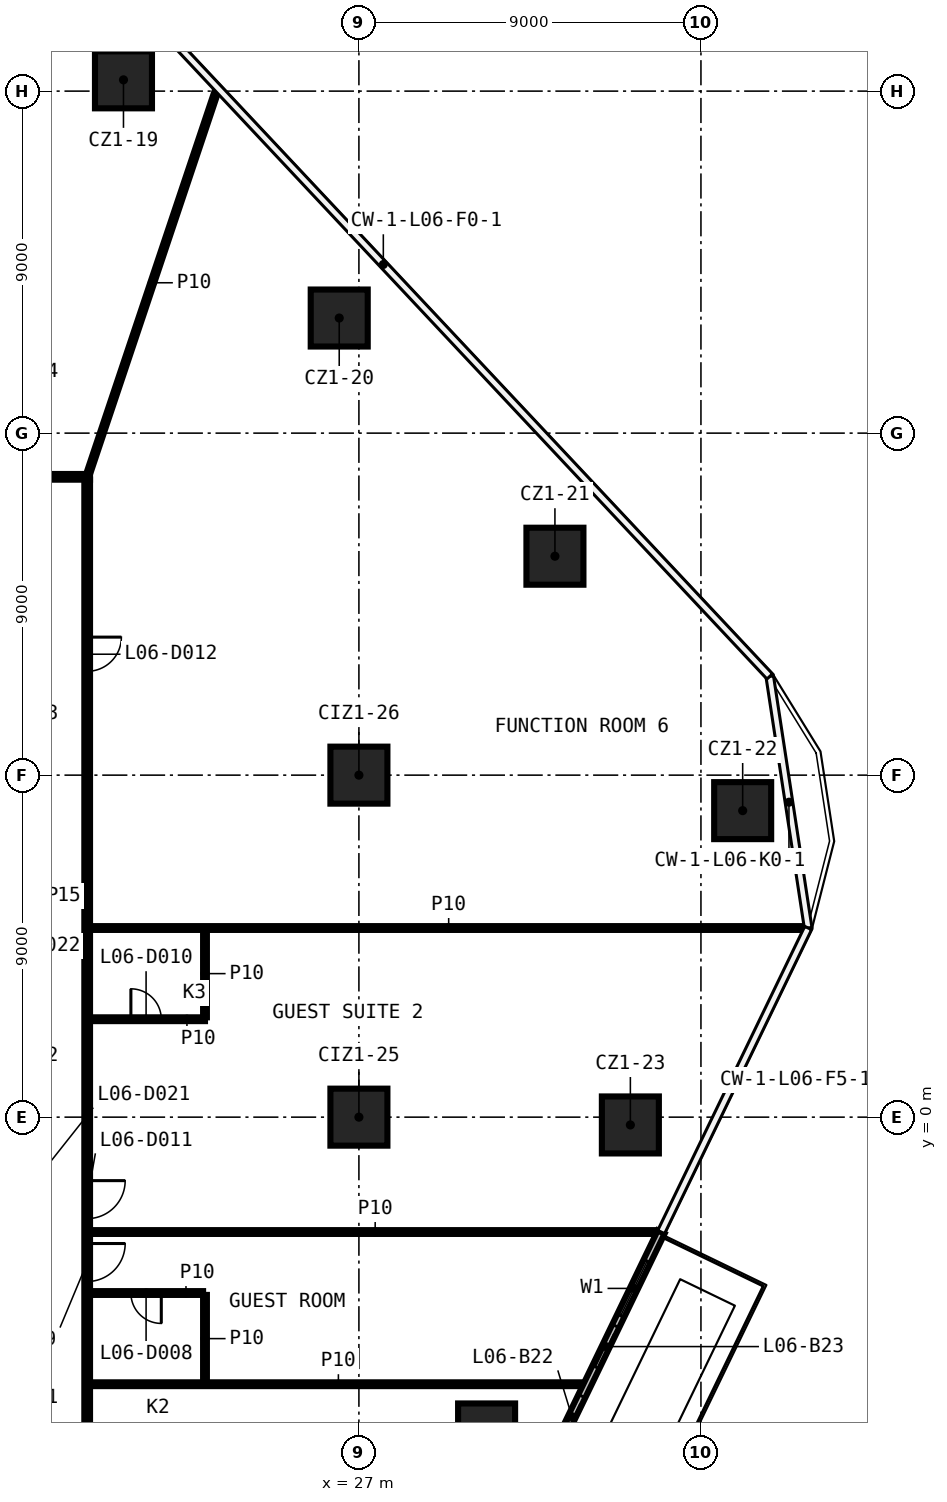
"""IFC4 building model, lengths in metres.
Left out: names, types, materials, properties, quantities, classifications, styles, units other than length and angle.
Written with IfcOpenShell. Run it as: python <this file> out.ifc"""

import sys

from ifc_helpers import new_model, si_unit, direction, frame, frame_2d, origin, origin_2d, place, context, subcontext, project, spatial, rectangle, extrude, element, fill, save


model = new_model("IFC4")
c1 = context("Model", 3, precision=1e-05, world=origin(), true_north=direction((0.0, 1.0)))
c2 = subcontext(c1, "Body", "Model", "MODEL_VIEW")
j1 = project(units=[si_unit("LENGTHUNIT", "METRE"), si_unit("PLANEANGLEUNIT", "RADIAN")], contexts=[c1])
p1 = place(None, origin())
s1 = spatial("IfcSite", under=j1, at=p1, CompositionType="ELEMENT")
p2 = place(p1, origin())
s2 = spatial("IfcBuilding", under=s1, at=p2, CompositionType="ELEMENT")
p3 = place(p2, frame((0.0, 0.0, 44.0)))
s3 = spatial("IfcBuildingStorey", under=s2, at=p3, CompositionType="ELEMENT", Elevation=44.0)
for number, where, z_axis, x_axis in (
    (1, (20.805, 27.297, 0.0), (0.0, 0.0, 1.0), (1.0, 0.0, 0.0)),
    (2, (26.482, 21.029, 0.0), (0.0, 0.0, 1.0), (1.0, 0.0, 0.0)),
    (3, (32.158, 14.761, 0.0), (0.0, 0.0, 1.0), (1.0, 0.0, 0.0)),
    (4, (37.098, 8.066, 0.0), (0.0, 0.0, 1.0), (1.0, 0.0, 0.0)),
    (5, (34.143, -0.205, 0.0), (0.0, 0.0, 1.0), (1.0, 0.0, 0.0)),
    (6, (30.36, -8.284, 0.0), (0.0, 0.0, 1.0), (1.0, 0.0, 0.0)),
    (7, (27.0, 0.0, 0.0), (0.0, 0.0, 1.0), (1.0, 0.0, 0.0)),
    (8, (27.0, 9.0, 0.0), (0.0, 0.0, 1.0), (1.0, 0.0, 0.0)),
):
    element("IfcColumn", number, at=place(p3, frame(where, z_axis=z_axis, x_axis=x_axis)), inside=s3, PredefinedType="COLUMN", context=c2, shape_type="SweptSolid", body=[
        extrude(rectangle(XDim=1.5, YDim=1.5, at=origin_2d()), origin(), (0.0, 0.0, 1.0), 3.3),
    ])
p4 = place(p3, frame((19.925, -7.028, 0.0), z_axis=(0.0, 0.0, 1.0), x_axis=(1.0, 0.0, 0.0)))
e9 = element("IfcWall", 9, at=p4, inside=s3, PredefinedType="PARTITIONING", context=c2, shape_type="SweptSolid", body=[
    extrude(rectangle(XDim=13.071, YDim=0.1, at=frame_2d((6.535, 0.0))), origin(), (0.0, 0.0, 1.0), 3.3),
])
p5 = place(p3, frame((22.9, -4.628, 0.0), z_axis=(0.0, 0.0, 1.0), x_axis=(-1.0, 0.0, 0.0)))
e10 = element("IfcWall", 10, at=p5, inside=s3, PredefinedType="PARTITIONING", context=c2, shape_type="SweptSolid", body=[
    extrude(rectangle(XDim=2.975, YDim=0.1, at=frame_2d((1.487, 0.0))), origin(), (0.0, 0.0, 1.0), 3.3),
])
p6 = place(p5, frame((1.1, 0.0, 0.0)))
e11 = element("IfcOpeningElement", 11, at=p6, cuts=e10, PredefinedType="OPENING", context=c2, shape_type="SweptSolid", body=[
    extrude(rectangle(XDim=0.8, YDim=2.1, at=frame_2d((0.4, 1.05))), frame((0.0, 0.06, 0.0), z_axis=(0.0, -1.0, 0.0), x_axis=(1.0, 0.0, 0.0)), (0.0, 0.0, 1.0), 0.12),
])
p7 = place(p3, frame((19.925, -3.023, 0.0), z_axis=(0.0, 0.0, 1.0), x_axis=(1.0, 0.0, 0.0)))
e12 = element("IfcWall", 12, at=p7, inside=s3, PredefinedType="PARTITIONING", context=c2, shape_type="SweptSolid", body=[
    extrude(rectangle(XDim=15.006, YDim=0.1, at=frame_2d((7.503, 0.0))), origin(), (0.0, 0.0, 1.0), 3.3),
])
p8 = place(p3, frame((19.925, 2.577, 0.0), z_axis=(0.0, 0.0, 1.0), x_axis=(1.0, 0.0, 0.0)))
e13 = element("IfcWall", 13, at=p8, inside=s3, PredefinedType="PARTITIONING", context=c2, shape_type="SweptSolid", body=[
    extrude(rectangle(XDim=3.025, YDim=0.1, at=frame_2d((1.512, 0.0))), origin(), (0.0, 0.0, 1.0), 3.3),
])
p9 = place(p8, frame((1.075, 0.0, 0.0)))
e14 = element("IfcOpeningElement", 14, at=p9, cuts=e13, PredefinedType="OPENING", context=c2, shape_type="SweptSolid", body=[
    extrude(rectangle(XDim=0.8, YDim=2.1, at=frame_2d((0.4, 1.05))), frame((0.0, 0.06, 0.0), z_axis=(0.0, -1.0, 0.0), x_axis=(1.0, 0.0, 0.0)), (0.0, 0.0, 1.0), 0.12),
])
p10 = place(p3, frame((19.925, 4.977, 0.0), z_axis=(0.0, 0.0, 1.0), x_axis=(1.0, 0.0, 0.0)))
e15 = element("IfcWall", 15, at=p10, inside=s3, PredefinedType="PARTITIONING", context=c2, shape_type="SweptSolid", body=[
    extrude(rectangle(XDim=18.874, YDim=0.1, at=frame_2d((9.437, 0.0))), origin(), (0.0, 0.0, 1.0), 3.3),
])
p11 = place(p3, frame((-19.925, 16.85, 0.0), z_axis=(0.0, 0.0, 1.0), x_axis=(1.0, 0.0, 0.0)))
e16 = element("IfcWall", 16, at=p11, inside=s3, PredefinedType="PARTITIONING", context=c2, shape_type="SweptSolid", body=[
    extrude(rectangle(XDim=39.85, YDim=0.15, at=frame_2d((19.925, 0.0))), origin(), (0.0, 0.0, 1.0), 3.3),
])
p12 = place(p11, frame((31.643, 0.0, 0.0)))
e17 = element("IfcOpeningElement", 17, at=p12, cuts=e16, PredefinedType="OPENING", context=c2, shape_type="SweptSolid", body=[
    extrude(rectangle(XDim=0.9, YDim=2.1, at=frame_2d((0.45, 1.05))), frame((0.0, 0.085, 0.0), z_axis=(0.0, -1.0, 0.0), x_axis=(1.0, 0.0, 0.0)), (0.0, 0.0, 1.0), 0.17),
])
p13 = place(p11, frame((22.056, 0.0, 0.0)))
e18 = element("IfcOpeningElement", 18, at=p13, cuts=e16, PredefinedType="OPENING", context=c2, shape_type="SweptSolid", body=[
    extrude(rectangle(XDim=0.9, YDim=2.1, at=frame_2d((0.45, 1.05))), frame((0.0, 0.085, 0.0), z_axis=(0.0, -1.0, 0.0), x_axis=(1.0, 0.0, 0.0)), (0.0, 0.0, 1.0), 0.17),
])
p14 = place(p11, frame((14.831, 0.0, 0.0)))
e19 = element("IfcOpeningElement", 19, at=p14, cuts=e16, PredefinedType="OPENING", context=c2, shape_type="SweptSolid", body=[
    extrude(rectangle(XDim=1.0, YDim=2.1, at=frame_2d((0.5, 1.05))), frame((0.0, 0.085, 0.0), z_axis=(0.0, -1.0, 0.0), x_axis=(1.0, 0.0, 0.0)), (0.0, 0.0, 1.0), 0.17),
])
p15 = place(p3, frame((19.85, 16.85, 0.0), z_axis=(0.0, 0.0, 1.0), x_axis=(0.317967659794, 0.948101559605, 0.0)))
e20 = element("IfcWall", 20, at=p15, inside=s3, PredefinedType="PARTITIONING", context=c2, shape_type="SweptSolid", body=[
    extrude(rectangle(XDim=10.773, YDim=0.1, at=frame_2d((5.387, 0.0))), origin(), (0.0, 0.0, 1.0), 3.3),
])
p16 = place(p3, frame((22.95, -6.978, 0.0), z_axis=(0.0, 0.0, 1.0), x_axis=(0.0, 1.0, 0.0)))
e21 = element("IfcWall", 21, at=p16, inside=s3, PredefinedType="PARTITIONING", context=c2, shape_type="SweptSolid", body=[
    extrude(rectangle(XDim=2.3, YDim=0.1, at=frame_2d((1.15, 0.0))), origin(), (0.0, 0.0, 1.0), 3.3),
])
p17 = place(p3, frame((22.95, 2.627, 0.0), z_axis=(0.0, 0.0, 1.0), x_axis=(0.0, 1.0, 0.0)))
e22 = element("IfcWall", 22, at=p17, inside=s3, PredefinedType="PARTITIONING", context=c2, shape_type="SweptSolid", body=[
    extrude(rectangle(XDim=2.3, YDim=0.1, at=frame_2d((1.15, 0.0))), origin(), (0.0, 0.0, 1.0), 3.3),
])
p18 = place(p3, frame((19.85, 16.775, 0.0), z_axis=(0.0, 0.0, 1.0), x_axis=(0.0, -1.0, 0.0)))
e23 = element("IfcWall", 23, at=p18, inside=s3, PredefinedType="PARTITIONING", context=c2, shape_type="SweptSolid", body=[
    extrude(rectangle(XDim=33.55, YDim=0.15, at=frame_2d((16.775, 0.0))), origin(), (0.0, 0.0, 1.0), 3.3),
])
p19 = place(p18, frame((29.016, 0.0, 0.0)))
e24 = element("IfcOpeningElement", 24, at=p19, cuts=e23, PredefinedType="OPENING", context=c2, shape_type="SweptSolid", body=[
    extrude(rectangle(XDim=1.0, YDim=2.1, at=frame_2d((0.5, 1.05))), frame((0.0, 0.085, 0.0), z_axis=(0.0, -1.0, 0.0), x_axis=(1.0, 0.0, 0.0)), (0.0, 0.0, 1.0), 0.17),
])
p20 = place(p18, frame((20.1, 0.0, 0.0)))
e25 = element("IfcOpeningElement", 25, at=p20, cuts=e23, PredefinedType="OPENING", context=c2, shape_type="SweptSolid", body=[
    extrude(rectangle(XDim=1.0, YDim=2.1, at=frame_2d((0.5, 1.05))), frame((0.0, 0.085, 0.0), z_axis=(0.0, -1.0, 0.0), x_axis=(1.0, 0.0, 0.0)), (0.0, 0.0, 1.0), 0.17),
])
p21 = place(p18, frame((18.446, 0.0, 0.0)))
e26 = element("IfcOpeningElement", 26, at=p21, cuts=e23, PredefinedType="OPENING", context=c2, shape_type="SweptSolid", body=[
    extrude(rectangle(XDim=1.0, YDim=2.1, at=frame_2d((0.5, 1.05))), frame((0.0, 0.085, 0.0), z_axis=(0.0, -1.0, 0.0), x_axis=(1.0, 0.0, 0.0)), (0.0, 0.0, 1.0), 0.17),
])
p22 = place(p18, frame((4.143, 0.0, 0.0)))
e27 = element("IfcOpeningElement", 27, at=p22, cuts=e23, PredefinedType="OPENING", context=c2, shape_type="SweptSolid", body=[
    extrude(rectangle(XDim=0.9, YDim=2.1, at=frame_2d((0.45, 1.05))), frame((0.0, 0.085, 0.0), z_axis=(0.0, -1.0, 0.0), x_axis=(1.0, 0.0, 0.0)), (0.0, 0.0, 1.0), 0.17),
])
p23 = place(p3, frame((23.338, -27.051, 0.0), z_axis=(0.0, 0.0, 1.0), x_axis=(0.43524886879, 0.900310181114, 0.0)))
e28 = element("IfcWall", 28, at=p23, inside=s3, PredefinedType="SOLIDWALL", context=c2, shape_type="SweptSolid", body=[
    extrude(rectangle(XDim=26.689, YDim=0.2, at=frame_2d((13.344, 0.0))), origin(), (0.0, 0.0, 1.0), 3.3),
])
p24 = place(p23, frame((0.5, 0.0, 0.6)))
e29 = element("IfcOpeningElement", 29, at=p24, cuts=e28, PredefinedType="OPENING", context=c2, shape_type="SweptSolid", body=[
    extrude(rectangle(XDim=1.6, YDim=2.4, at=frame_2d((0.8, 1.2))), frame((0.0, 0.11, 0.0), z_axis=(0.0, -1.0, 0.0), x_axis=(1.0, 0.0, 0.0)), (0.0, 0.0, 1.0), 0.22),
])
p25 = place(p23, frame((3.0, 0.0, 0.0)))
e30 = element("IfcOpeningElement", 30, at=p25, cuts=e28, PredefinedType="OPENING", context=c2, shape_type="SweptSolid", body=[
    extrude(rectangle(XDim=1.2, YDim=2.4, at=frame_2d((0.6, 1.2))), frame((0.0, 0.11, 0.0), z_axis=(0.0, -1.0, 0.0), x_axis=(1.0, 0.0, 0.0)), (0.0, 0.0, 1.0), 0.22),
])
p26 = place(p23, frame((6.448, 0.0, 0.6)))
e31 = element("IfcOpeningElement", 31, at=p26, cuts=e28, PredefinedType="OPENING", context=c2, shape_type="SweptSolid", body=[
    extrude(rectangle(XDim=1.6, YDim=2.4, at=frame_2d((0.8, 1.2))), frame((0.0, 0.11, 0.0), z_axis=(0.0, -1.0, 0.0), x_axis=(1.0, 0.0, 0.0)), (0.0, 0.0, 1.0), 0.22),
])
p27 = place(p23, frame((4.948, 0.0, 0.0)))
e32 = element("IfcOpeningElement", 32, at=p27, cuts=e28, PredefinedType="OPENING", context=c2, shape_type="SweptSolid", body=[
    extrude(rectangle(XDim=1.2, YDim=2.4, at=frame_2d((0.6, 1.2))), frame((0.0, 0.11, 0.0), z_axis=(0.0, -1.0, 0.0), x_axis=(1.0, 0.0, 0.0)), (0.0, 0.0, 1.0), 0.22),
])
p28 = place(p23, frame((9.396, 0.0, 0.6)))
e33 = element("IfcOpeningElement", 33, at=p28, cuts=e28, PredefinedType="OPENING", context=c2, shape_type="SweptSolid", body=[
    extrude(rectangle(XDim=1.6, YDim=2.4, at=frame_2d((0.8, 1.2))), frame((0.0, 0.11, 0.0), z_axis=(0.0, -1.0, 0.0), x_axis=(1.0, 0.0, 0.0)), (0.0, 0.0, 1.0), 0.22),
])
p29 = place(p23, frame((11.896, 0.0, 0.0)))
e34 = element("IfcOpeningElement", 34, at=p29, cuts=e28, PredefinedType="OPENING", context=c2, shape_type="SweptSolid", body=[
    extrude(rectangle(XDim=1.2, YDim=2.4, at=frame_2d((0.6, 1.2))), frame((0.0, 0.11, 0.0), z_axis=(0.0, -1.0, 0.0), x_axis=(1.0, 0.0, 0.0)), (0.0, 0.0, 1.0), 0.22),
])
p30 = place(p23, frame((15.344, 0.0, 0.6)))
e35 = element("IfcOpeningElement", 35, at=p30, cuts=e28, PredefinedType="OPENING", context=c2, shape_type="SweptSolid", body=[
    extrude(rectangle(XDim=1.6, YDim=2.4, at=frame_2d((0.8, 1.2))), frame((0.0, 0.11, 0.0), z_axis=(0.0, -1.0, 0.0), x_axis=(1.0, 0.0, 0.0)), (0.0, 0.0, 1.0), 0.22),
])
p31 = place(p23, frame((13.844, 0.0, 0.0)))
e36 = element("IfcOpeningElement", 36, at=p31, cuts=e28, PredefinedType="OPENING", context=c2, shape_type="SweptSolid", body=[
    extrude(rectangle(XDim=1.2, YDim=2.4, at=frame_2d((0.6, 1.2))), frame((0.0, 0.11, 0.0), z_axis=(0.0, -1.0, 0.0), x_axis=(1.0, 0.0, 0.0)), (0.0, 0.0, 1.0), 0.22),
])
p32 = place(p23, frame((18.292, 0.0, 0.6)))
e37 = element("IfcOpeningElement", 37, at=p32, cuts=e28, PredefinedType="OPENING", context=c2, shape_type="SweptSolid", body=[
    extrude(rectangle(XDim=1.6, YDim=2.4, at=frame_2d((0.8, 1.2))), frame((0.0, 0.11, 0.0), z_axis=(0.0, -1.0, 0.0), x_axis=(1.0, 0.0, 0.0)), (0.0, 0.0, 1.0), 0.22),
])
p33 = place(p23, frame((20.692, 0.0, 0.0)))
e38 = element("IfcOpeningElement", 38, at=p33, cuts=e28, PredefinedType="OPENING", context=c2, shape_type="SweptSolid", body=[
    extrude(rectangle(XDim=1.2, YDim=2.4, at=frame_2d((0.6, 1.2))), frame((0.0, 0.11, 0.0), z_axis=(0.0, -1.0, 0.0), x_axis=(1.0, 0.0, 0.0)), (0.0, 0.0, 1.0), 0.22),
])
p34 = place(p23, frame((24.24, 0.0, 0.6)))
e39 = element("IfcOpeningElement", 39, at=p34, cuts=e28, PredefinedType="OPENING", context=c2, shape_type="SweptSolid", body=[
    extrude(rectangle(XDim=1.6, YDim=2.4, at=frame_2d((0.8, 1.2))), frame((0.0, 0.11, 0.0), z_axis=(0.0, -1.0, 0.0), x_axis=(1.0, 0.0, 0.0)), (0.0, 0.0, 1.0), 0.22),
])
p35 = place(p23, frame((22.74, 0.0, 0.0)))
e40 = element("IfcOpeningElement", 40, at=p35, cuts=e28, PredefinedType="OPENING", context=c2, shape_type="SweptSolid", body=[
    extrude(rectangle(XDim=1.2, YDim=2.4, at=frame_2d((0.6, 1.2))), frame((0.0, 0.11, 0.0), z_axis=(0.0, -1.0, 0.0), x_axis=(1.0, 0.0, 0.0)), (0.0, 0.0, 1.0), 0.22),
])
p36 = place(p6, origin())
e41 = element("IfcDoor", 41, at=p36, inside=s3, OperationType="SINGLE_SWING_LEFT", PredefinedType="DOOR", context=c2, shape_type="SweptSolid", body=[
    extrude(rectangle(XDim=0.8, YDim=2.1, at=frame_2d((0.4, 1.05))), frame((0.0, 0.025, 0.0), z_axis=(0.0, -1.0, 0.0), x_axis=(1.0, 0.0, 0.0)), (0.0, 0.0, 1.0), 0.05),
])
fill(e11, e41)
p37 = place(p20, origin())
e42 = element("IfcDoor", 42, at=p37, inside=s3, OperationType="SINGLE_SWING_RIGHT", PredefinedType="DOOR", context=c2, shape_type="SweptSolid", body=[
    extrude(rectangle(XDim=1.0, YDim=2.1, at=frame_2d((0.5, 1.05))), frame((0.0, 0.025, 0.0), z_axis=(0.0, -1.0, 0.0), x_axis=(1.0, 0.0, 0.0)), (0.0, 0.0, 1.0), 0.05),
])
fill(e25, e42)
p38 = place(p9, origin())
e43 = element("IfcDoor", 43, at=p38, inside=s3, OperationType="SINGLE_SWING_RIGHT", PredefinedType="DOOR", context=c2, shape_type="SweptSolid", body=[
    extrude(rectangle(XDim=0.8, YDim=2.1, at=frame_2d((0.4, 1.05))), frame((0.0, 0.025, 0.0), z_axis=(0.0, -1.0, 0.0), x_axis=(1.0, 0.0, 0.0)), (0.0, 0.0, 1.0), 0.05),
])
fill(e14, e43)
p39 = place(p21, origin())
e44 = element("IfcDoor", 44, at=p39, inside=s3, OperationType="SINGLE_SWING_LEFT", PredefinedType="DOOR", context=c2, shape_type="SweptSolid", body=[
    extrude(rectangle(XDim=1.0, YDim=2.1, at=frame_2d((0.5, 1.05))), frame((0.0, 0.025, 0.0), z_axis=(0.0, -1.0, 0.0), x_axis=(1.0, 0.0, 0.0)), (0.0, 0.0, 1.0), 0.05),
])
fill(e26, e44)
p40 = place(p22, origin())
e45 = element("IfcDoor", 45, at=p40, inside=s3, OperationType="SINGLE_SWING_RIGHT", PredefinedType="DOOR", context=c2, shape_type="SweptSolid", body=[
    extrude(rectangle(XDim=0.9, YDim=2.1, at=frame_2d((0.45, 1.05))), frame((0.0, 0.025, 0.0), z_axis=(0.0, -1.0, 0.0), x_axis=(1.0, 0.0, 0.0)), (0.0, 0.0, 1.0), 0.05),
])
fill(e27, e45)
p41 = place(p33, origin())
e46 = element("IfcDoor", 46, at=p41, inside=s3, OperationType="SLIDING_TO_LEFT", PredefinedType="DOOR", context=c2, shape_type="SweptSolid", body=[
    extrude(rectangle(XDim=1.2, YDim=2.4, at=frame_2d((0.6, 1.2))), frame((0.0, 0.025, 0.0), z_axis=(0.0, -1.0, 0.0), x_axis=(1.0, 0.0, 0.0)), (0.0, 0.0, 1.0), 0.05),
])
fill(e38, e46)
p42 = place(p34, origin())
e47 = element("IfcWindow", 47, at=p42, inside=s3, PartitioningType="SINGLE_PANEL", PredefinedType="WINDOW", context=c2, shape_type="SweptSolid", body=[
    extrude(rectangle(XDim=1.6, YDim=2.4, at=frame_2d((0.8, 1.2))), frame((0.0, 0.03, 0.0), z_axis=(0.0, -1.0, 0.0), x_axis=(1.0, 0.0, 0.0)), (0.0, 0.0, 1.0), 0.06),
])
fill(e39, e47)
p43 = place(p35, origin())
e48 = element("IfcDoor", 48, at=p43, inside=s3, OperationType="SLIDING_TO_LEFT", PredefinedType="DOOR", context=c2, shape_type="SweptSolid", body=[
    extrude(rectangle(XDim=1.2, YDim=2.4, at=frame_2d((0.6, 1.2))), frame((0.0, 0.025, 0.0), z_axis=(0.0, -1.0, 0.0), x_axis=(1.0, 0.0, 0.0)), (0.0, 0.0, 1.0), 0.05),
])
fill(e40, e48)
save(model, sys.argv[1])
